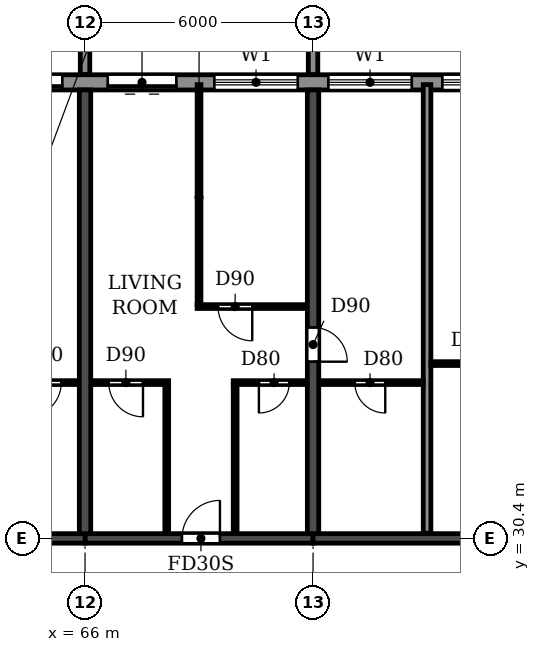
"""IFC4 building model, lengths in metres.
Left out: names, types, materials, properties, quantities, classifications, styles, units other than length and angle.
Written with IfcOpenShell. Run it as: python <this file> out.ifc"""

import sys

from ifc_helpers import new_model, si_unit, direction, frame, frame_2d, origin, place, context, subcontext, project, spatial, polyline, rectangle, outline, extrude, source, transform, mapped, element, fill, save


model = new_model("IFC4")
c1 = context("Model", 3, precision=1e-05, world=origin(), true_north=direction((0.0, 1.0)))
c2 = subcontext(c1, "Body", "Model", "MODEL_VIEW")
j1 = project(units=[si_unit("LENGTHUNIT", "METRE"), si_unit("PLANEANGLEUNIT", "RADIAN")], contexts=[c1])
p1 = place(None, origin())
s1 = spatial("IfcSite", under=j1, at=p1, CompositionType="ELEMENT")
p2 = place(p1, origin())
s2 = spatial("IfcBuilding", under=s1, at=p2, CompositionType="ELEMENT")
p3 = place(p2, frame((0.0, 0.0, 125.7)))
s3 = spatial("IfcBuildingStorey", under=s2, at=p3, CompositionType="ELEMENT", Elevation=125.7)
p4 = place(p3, frame((66.0, 30.525, 0.0), z_axis=(0.0, 0.0, 1.0), x_axis=(0.0, 1.0, 0.0)))
e1 = element("IfcWall", 1, at=p4, inside=s3, PredefinedType="SHEAR", context=c2, shape_type="SweptSolid", body=[
    extrude(rectangle(XDim=11.675, YDim=0.3, at=frame_2d((5.837, 0.0))), origin(), (0.0, 0.0, 1.0), 3.07),
])
p5 = place(p3, frame((72.0, 30.525, 0.0), z_axis=(0.0, 0.0, 1.0), x_axis=(0.0, 1.0, 0.0)))
e2 = element("IfcWall", 2, at=p5, inside=s3, PredefinedType="SHEAR", context=c2, shape_type="SweptSolid", body=[
    extrude(rectangle(XDim=11.675, YDim=0.3, at=frame_2d((5.837, 0.0))), origin(), (0.0, 0.0, 1.0), 3.07),
])
p6 = place(p5, frame((4.525, 0.0, 0.0)))
e3 = element("IfcOpeningElement", 3, at=p6, cuts=e2, PredefinedType="OPENING", context=c2, shape_type="SweptSolid", body=[
    extrude(rectangle(XDim=0.9, YDim=2.1, at=frame_2d((0.45, 1.05))), frame((0.0, 0.16, 0.0), z_axis=(0.0, -1.0, 0.0), x_axis=(1.0, 0.0, 0.0)), (0.0, 0.0, 1.0), 0.32),
])
p7 = place(p3, frame((60.0, 30.4, 0.0), z_axis=(0.0, 0.0, 1.0), x_axis=(1.0, 0.0, 0.0)))
e4 = element("IfcWall", 4, at=p7, inside=s3, PredefinedType="SHEAR", context=c2, shape_type="SweptSolid", body=[
    extrude(rectangle(XDim=6.0, YDim=0.25, at=frame_2d((3.0, 0.0))), origin(), (0.0, 0.0, 1.0), 2.47),
])
p8 = place(p7, frame((2.45, 0.0, 0.0)))
e5 = element("IfcOpeningElement", 5, at=p8, cuts=e4, PredefinedType="OPENING", context=c2, shape_type="SweptSolid", body=[
    extrude(rectangle(XDim=1.0, YDim=2.1, at=frame_2d((0.5, 1.05))), frame((0.0, 0.135, 0.0), z_axis=(0.0, -1.0, 0.0), x_axis=(1.0, 0.0, 0.0)), (0.0, 0.0, 1.0), 0.27),
])
p9 = place(p3, frame((66.0, 30.4, 0.0), z_axis=(0.0, 0.0, 1.0), x_axis=(1.0, 0.0, 0.0)))
e6 = element("IfcWall", 6, at=p9, inside=s3, PredefinedType="SHEAR", context=c2, shape_type="SweptSolid", body=[
    extrude(rectangle(XDim=6.0, YDim=0.25, at=frame_2d((3.0, 0.0))), origin(), (0.0, 0.0, 1.0), 2.47),
])
p10 = place(p9, frame((2.55, 0.0, 0.0)))
e7 = element("IfcOpeningElement", 7, at=p10, cuts=e6, PredefinedType="OPENING", context=c2, shape_type="SweptSolid", body=[
    extrude(rectangle(XDim=1.0, YDim=2.1, at=frame_2d((0.5, 1.05))), frame((0.0, 0.135, 0.0), z_axis=(0.0, -1.0, 0.0), x_axis=(1.0, 0.0, 0.0)), (0.0, 0.0, 1.0), 0.27),
])
p11 = place(p3, frame((72.0, 30.4, 0.0), z_axis=(0.0, 0.0, 1.0), x_axis=(1.0, 0.0, 0.0)))
e8 = element("IfcWall", 8, at=p11, inside=s3, PredefinedType="SHEAR", context=c2, shape_type="SweptSolid", body=[
    extrude(rectangle(XDim=6.0, YDim=0.25, at=frame_2d((3.0, 0.0))), origin(), (0.0, 0.0, 1.0), 2.47),
])
p12 = place(p3, frame((85.317, 42.4, 0.0), z_axis=(0.0, 0.0, 1.0), x_axis=(-1.0, 0.0, 0.0)))
e9 = element("IfcWall", 9, at=p12, inside=s3, PredefinedType="STANDARD", context=c2, shape_type="SweptSolid", body=[
    extrude(rectangle(XDim=68.634, YDim=0.4, at=frame_2d((34.317, 0.0))), origin(), (0.0, 0.0, 1.0), 3.07),
])
p13 = place(p12, frame((64.717, 0.0, 0.9)))
e10 = element("IfcOpeningElement", 10, at=p13, cuts=e9, PredefinedType="OPENING", context=c2, shape_type="SweptSolid", body=[
    extrude(rectangle(XDim=2.2, YDim=1.5, at=frame_2d((1.1, 0.75))), frame((0.0, 0.21, 0.0), z_axis=(0.0, -1.0, 0.0), x_axis=(1.0, 0.0, 0.0)), (0.0, 0.0, 1.0), 0.42),
])
p14 = place(p12, frame((61.917, 0.0, 0.0)))
e11 = element("IfcOpeningElement", 11, at=p14, cuts=e9, PredefinedType="OPENING", context=c2, shape_type="SweptSolid", body=[
    extrude(rectangle(XDim=1.8, YDim=2.4, at=frame_2d((0.9, 1.2))), frame((0.0, 0.21, 0.0), z_axis=(0.0, -1.0, 0.0), x_axis=(1.0, 0.0, 0.0)), (0.0, 0.0, 1.0), 0.42),
])
p15 = place(p12, frame((58.717, 0.0, 0.9)))
e12 = element("IfcOpeningElement", 12, at=p15, cuts=e9, PredefinedType="OPENING", context=c2, shape_type="SweptSolid", body=[
    extrude(rectangle(XDim=2.2, YDim=1.5, at=frame_2d((1.1, 0.75))), frame((0.0, 0.21, 0.0), z_axis=(0.0, -1.0, 0.0), x_axis=(1.0, 0.0, 0.0)), (0.0, 0.0, 1.0), 0.42),
])
p16 = place(p12, frame((55.917, 0.0, 0.0)))
e13 = element("IfcOpeningElement", 13, at=p16, cuts=e9, PredefinedType="OPENING", context=c2, shape_type="SweptSolid", body=[
    extrude(rectangle(XDim=1.8, YDim=2.4, at=frame_2d((0.9, 1.2))), frame((0.0, 0.21, 0.0), z_axis=(0.0, -1.0, 0.0), x_axis=(1.0, 0.0, 0.0)), (0.0, 0.0, 1.0), 0.42),
])
p17 = place(p12, frame((52.717, 0.0, 0.9)))
e14 = element("IfcOpeningElement", 14, at=p17, cuts=e9, PredefinedType="OPENING", context=c2, shape_type="SweptSolid", body=[
    extrude(rectangle(XDim=2.2, YDim=1.5, at=frame_2d((1.1, 0.75))), frame((0.0, 0.21, 0.0), z_axis=(0.0, -1.0, 0.0), x_axis=(1.0, 0.0, 0.0)), (0.0, 0.0, 1.0), 0.42),
])
p18 = place(p12, frame((49.917, 0.0, 0.0)))
e15 = element("IfcOpeningElement", 15, at=p18, cuts=e9, PredefinedType="OPENING", context=c2, shape_type="SweptSolid", body=[
    extrude(rectangle(XDim=1.8, YDim=2.4, at=frame_2d((0.9, 1.2))), frame((0.0, 0.21, 0.0), z_axis=(0.0, -1.0, 0.0), x_axis=(1.0, 0.0, 0.0)), (0.0, 0.0, 1.0), 0.42),
])
p19 = place(p12, frame((46.717, 0.0, 0.9)))
e16 = element("IfcOpeningElement", 16, at=p19, cuts=e9, PredefinedType="OPENING", context=c2, shape_type="SweptSolid", body=[
    extrude(rectangle(XDim=2.2, YDim=1.5, at=frame_2d((1.1, 0.75))), frame((0.0, 0.21, 0.0), z_axis=(0.0, -1.0, 0.0), x_axis=(1.0, 0.0, 0.0)), (0.0, 0.0, 1.0), 0.42),
])
p20 = place(p12, frame((43.917, 0.0, 0.0)))
e17 = element("IfcOpeningElement", 17, at=p20, cuts=e9, PredefinedType="OPENING", context=c2, shape_type="SweptSolid", body=[
    extrude(rectangle(XDim=1.8, YDim=2.4, at=frame_2d((0.9, 1.2))), frame((0.0, 0.21, 0.0), z_axis=(0.0, -1.0, 0.0), x_axis=(1.0, 0.0, 0.0)), (0.0, 0.0, 1.0), 0.42),
])
p21 = place(p12, frame((40.717, 0.0, 0.9)))
e18 = element("IfcOpeningElement", 18, at=p21, cuts=e9, PredefinedType="OPENING", context=c2, shape_type="SweptSolid", body=[
    extrude(rectangle(XDim=2.2, YDim=1.5, at=frame_2d((1.1, 0.75))), frame((0.0, 0.21, 0.0), z_axis=(0.0, -1.0, 0.0), x_axis=(1.0, 0.0, 0.0)), (0.0, 0.0, 1.0), 0.42),
])
p22 = place(p12, frame((37.717, 0.0, 0.9)))
e19 = element("IfcOpeningElement", 19, at=p22, cuts=e9, PredefinedType="OPENING", context=c2, shape_type="SweptSolid", body=[
    extrude(rectangle(XDim=2.2, YDim=1.5, at=frame_2d((1.1, 0.75))), frame((0.0, 0.21, 0.0), z_axis=(0.0, -1.0, 0.0), x_axis=(1.0, 0.0, 0.0)), (0.0, 0.0, 1.0), 0.42),
])
p23 = place(p12, frame((34.917, 0.0, 0.0)))
e20 = element("IfcOpeningElement", 20, at=p23, cuts=e9, PredefinedType="OPENING", context=c2, shape_type="SweptSolid", body=[
    extrude(rectangle(XDim=1.8, YDim=2.4, at=frame_2d((0.9, 1.2))), frame((0.0, 0.21, 0.0), z_axis=(0.0, -1.0, 0.0), x_axis=(1.0, 0.0, 0.0)), (0.0, 0.0, 1.0), 0.42),
])
p24 = place(p12, frame((31.717, 0.0, 0.9)))
e21 = element("IfcOpeningElement", 21, at=p24, cuts=e9, PredefinedType="OPENING", context=c2, shape_type="SweptSolid", body=[
    extrude(rectangle(XDim=2.2, YDim=1.5, at=frame_2d((1.1, 0.75))), frame((0.0, 0.21, 0.0), z_axis=(0.0, -1.0, 0.0), x_axis=(1.0, 0.0, 0.0)), (0.0, 0.0, 1.0), 0.42),
])
p25 = place(p12, frame((28.717, 0.0, 0.9)))
e22 = element("IfcOpeningElement", 22, at=p25, cuts=e9, PredefinedType="OPENING", context=c2, shape_type="SweptSolid", body=[
    extrude(rectangle(XDim=2.2, YDim=1.5, at=frame_2d((1.1, 0.75))), frame((0.0, 0.21, 0.0), z_axis=(0.0, -1.0, 0.0), x_axis=(1.0, 0.0, 0.0)), (0.0, 0.0, 1.0), 0.42),
])
p26 = place(p12, frame((25.717, 0.0, 0.9)))
e23 = element("IfcOpeningElement", 23, at=p26, cuts=e9, PredefinedType="OPENING", context=c2, shape_type="SweptSolid", body=[
    extrude(rectangle(XDim=2.2, YDim=1.5, at=frame_2d((1.1, 0.75))), frame((0.0, 0.21, 0.0), z_axis=(0.0, -1.0, 0.0), x_axis=(1.0, 0.0, 0.0)), (0.0, 0.0, 1.0), 0.42),
])
p27 = place(p12, frame((22.717, 0.0, 0.9)))
e24 = element("IfcOpeningElement", 24, at=p27, cuts=e9, PredefinedType="OPENING", context=c2, shape_type="SweptSolid", body=[
    extrude(rectangle(XDim=2.2, YDim=1.5, at=frame_2d((1.1, 0.75))), frame((0.0, 0.21, 0.0), z_axis=(0.0, -1.0, 0.0), x_axis=(1.0, 0.0, 0.0)), (0.0, 0.0, 1.0), 0.42),
])
p28 = place(p12, frame((19.917, 0.0, 0.0)))
e25 = element("IfcOpeningElement", 25, at=p28, cuts=e9, PredefinedType="OPENING", context=c2, shape_type="SweptSolid", body=[
    extrude(rectangle(XDim=1.8, YDim=2.4, at=frame_2d((0.9, 1.2))), frame((0.0, 0.21, 0.0), z_axis=(0.0, -1.0, 0.0), x_axis=(1.0, 0.0, 0.0)), (0.0, 0.0, 1.0), 0.42),
])
p29 = place(p12, frame((16.917, 0.0, 0.0)))
e26 = element("IfcOpeningElement", 26, at=p29, cuts=e9, PredefinedType="OPENING", context=c2, shape_type="SweptSolid", body=[
    extrude(rectangle(XDim=1.8, YDim=2.4, at=frame_2d((0.9, 1.2))), frame((0.0, 0.21, 0.0), z_axis=(0.0, -1.0, 0.0), x_axis=(1.0, 0.0, 0.0)), (0.0, 0.0, 1.0), 0.42),
])
p30 = place(p12, frame((13.717, 0.0, 0.9)))
e27 = element("IfcOpeningElement", 27, at=p30, cuts=e9, PredefinedType="OPENING", context=c2, shape_type="SweptSolid", body=[
    extrude(rectangle(XDim=2.2, YDim=1.5, at=frame_2d((1.1, 0.75))), frame((0.0, 0.21, 0.0), z_axis=(0.0, -1.0, 0.0), x_axis=(1.0, 0.0, 0.0)), (0.0, 0.0, 1.0), 0.42),
])
p31 = place(p12, frame((10.717, 0.0, 0.9)))
e28 = element("IfcOpeningElement", 28, at=p31, cuts=e9, PredefinedType="OPENING", context=c2, shape_type="SweptSolid", body=[
    extrude(rectangle(XDim=2.2, YDim=1.5, at=frame_2d((1.1, 0.75))), frame((0.0, 0.21, 0.0), z_axis=(0.0, -1.0, 0.0), x_axis=(1.0, 0.0, 0.0)), (0.0, 0.0, 1.0), 0.42),
])
p32 = place(p12, frame((7.717, 0.0, 0.9)))
e29 = element("IfcOpeningElement", 29, at=p32, cuts=e9, PredefinedType="OPENING", context=c2, shape_type="SweptSolid", body=[
    extrude(rectangle(XDim=2.2, YDim=1.5, at=frame_2d((1.1, 0.75))), frame((0.0, 0.21, 0.0), z_axis=(0.0, -1.0, 0.0), x_axis=(1.0, 0.0, 0.0)), (0.0, 0.0, 1.0), 0.42),
])
p33 = place(p12, frame((4.917, 0.0, 0.0)))
e30 = element("IfcOpeningElement", 30, at=p33, cuts=e9, PredefinedType="OPENING", context=c2, shape_type="SweptSolid", body=[
    extrude(rectangle(XDim=1.8, YDim=2.4, at=frame_2d((0.9, 1.2))), frame((0.0, 0.21, 0.0), z_axis=(0.0, -1.0, 0.0), x_axis=(1.0, 0.0, 0.0)), (0.0, 0.0, 1.0), 0.42),
])
p34 = place(p12, frame((1.717, 0.0, 0.9)))
e31 = element("IfcOpeningElement", 31, at=p34, cuts=e9, PredefinedType="OPENING", context=c2, shape_type="SweptSolid", body=[
    extrude(rectangle(XDim=2.2, YDim=1.5, at=frame_2d((1.1, 0.75))), frame((0.0, 0.21, 0.0), z_axis=(0.0, -1.0, 0.0), x_axis=(1.0, 0.0, 0.0)), (0.0, 0.0, 1.0), 0.42),
])
m1 = source(origin(), c2, "Body", "SweptSolid", [
    extrude(outline(polyline([(0.0, 0.0), (0.25, 0.0), (0.25, 3.1), (0.0, 3.1), (0.0, 0.0)])), origin(), (0.0, 0.0, 1.0), 3.1),
])
for number, where in (
    (32, (65.875, 42.6, 0.0)),
    (33, (71.875, 42.6, 0.0)),
):
    element("IfcWall", number, at=place(p3, frame(where)), inside=s3, PredefinedType="STANDARD", context=c2, shape_type="MappedRepresentation", body=[
        mapped(m1, transform((0.0, 0.0, 0.0))),
    ])
p35 = place(p3, frame((75.0, 30.535, 0.0), z_axis=(0.0, 0.0, 1.0), x_axis=(0.0, 1.0, 0.0)))
e34 = element("IfcWall", 34, at=p35, inside=s3, PredefinedType="PARTITIONING", context=c2, shape_type="SweptSolid", body=[
    extrude(rectangle(XDim=11.805, YDim=0.2, at=frame_2d((5.903, 0.0))), origin(), (0.0, 0.0, 1.0), 3.07),
])
p36 = place(p3, frame((63.8, 34.5, 0.0), z_axis=(0.0, 0.0, 1.0), x_axis=(1.0, 0.0, 0.0)))
e35 = element("IfcWall", 35, at=p36, inside=s3, PredefinedType="PARTITIONING", context=c2, shape_type="SweptSolid", body=[
    extrude(rectangle(XDim=2.04, YDim=0.1, at=frame_2d((1.02, 0.0))), origin(), (0.0, 0.0, 1.0), 3.07),
])
p37 = place(p36, frame((0.675, 0.0, 0.0)))
e36 = element("IfcOpeningElement", 36, at=p37, cuts=e35, PredefinedType="OPENING", context=c2, shape_type="SweptSolid", body=[
    extrude(rectangle(XDim=0.9, YDim=2.1, at=frame_2d((0.45, 1.05))), frame((0.0, 0.06, 0.0), z_axis=(0.0, -1.0, 0.0), x_axis=(1.0, 0.0, 0.0)), (0.0, 0.0, 1.0), 0.12),
])
p38 = place(p3, frame((66.16, 34.5, 0.0), z_axis=(0.0, 0.0, 1.0), x_axis=(1.0, 0.0, 0.0)))
e37 = element("IfcWall", 37, at=p38, inside=s3, PredefinedType="PARTITIONING", context=c2, shape_type="SweptSolid", body=[
    extrude(rectangle(XDim=2.04, YDim=0.1, at=frame_2d((1.02, 0.0))), origin(), (0.0, 0.0, 1.0), 3.07),
])
p39 = place(p38, frame((0.465, 0.0, 0.0)))
e38 = element("IfcOpeningElement", 38, at=p39, cuts=e37, PredefinedType="OPENING", context=c2, shape_type="SweptSolid", body=[
    extrude(rectangle(XDim=0.9, YDim=2.1, at=frame_2d((0.45, 1.05))), frame((0.0, 0.06, 0.0), z_axis=(0.0, -1.0, 0.0), x_axis=(1.0, 0.0, 0.0)), (0.0, 0.0, 1.0), 0.12),
])
p40 = place(p3, frame((69.9, 34.5, 0.0), z_axis=(0.0, 0.0, 1.0), x_axis=(1.0, 0.0, 0.0)))
e39 = element("IfcWall", 39, at=p40, inside=s3, PredefinedType="PARTITIONING", context=c2, shape_type="SweptSolid", body=[
    extrude(rectangle(XDim=1.94, YDim=0.1, at=frame_2d((0.97, 0.0))), origin(), (0.0, 0.0, 1.0), 3.07),
])
p41 = place(p40, frame((0.675, 0.0, 0.0)))
e40 = element("IfcOpeningElement", 40, at=p41, cuts=e39, PredefinedType="OPENING", context=c2, shape_type="SweptSolid", body=[
    extrude(rectangle(XDim=0.8, YDim=2.1, at=frame_2d((0.4, 1.05))), frame((0.0, 0.06, 0.0), z_axis=(0.0, -1.0, 0.0), x_axis=(1.0, 0.0, 0.0)), (0.0, 0.0, 1.0), 0.12),
])
p42 = place(p3, frame((72.16, 34.5, 0.0), z_axis=(0.0, 0.0, 1.0), x_axis=(1.0, 0.0, 0.0)))
e41 = element("IfcWall", 41, at=p42, inside=s3, PredefinedType="PARTITIONING", context=c2, shape_type="SweptSolid", body=[
    extrude(rectangle(XDim=2.74, YDim=0.1, at=frame_2d((1.37, 0.0))), origin(), (0.0, 0.0, 1.0), 3.07),
])
p43 = place(p42, frame((0.94, 0.0, 0.0)))
e42 = element("IfcOpeningElement", 42, at=p43, cuts=e41, PredefinedType="OPENING", context=c2, shape_type="SweptSolid", body=[
    extrude(rectangle(XDim=0.8, YDim=2.1, at=frame_2d((0.4, 1.05))), frame((0.0, 0.06, 0.0), z_axis=(0.0, -1.0, 0.0), x_axis=(1.0, 0.0, 0.0)), (0.0, 0.0, 1.0), 0.12),
])
p44 = place(p3, frame((75.1, 35.0, 0.0), z_axis=(0.0, 0.0, 1.0), x_axis=(1.0, 0.0, 0.0)))
e43 = element("IfcWall", 43, at=p44, inside=s3, PredefinedType="PARTITIONING", context=c2, shape_type="SweptSolid", body=[
    extrude(rectangle(XDim=2.74, YDim=0.1, at=frame_2d((1.37, 0.0))), origin(), (0.0, 0.0, 1.0), 3.07),
])
p45 = place(p44, frame((1.0, 0.0, 0.0)))
e44 = element("IfcOpeningElement", 44, at=p45, cuts=e43, PredefinedType="OPENING", context=c2, shape_type="SweptSolid", body=[
    extrude(rectangle(XDim=0.8, YDim=2.1, at=frame_2d((0.4, 1.05))), frame((0.0, 0.06, 0.0), z_axis=(0.0, -1.0, 0.0), x_axis=(1.0, 0.0, 0.0)), (0.0, 0.0, 1.0), 0.12),
])
p46 = place(p3, frame((68.95, 36.5, 0.0), z_axis=(0.0, 0.0, 1.0), x_axis=(1.0, 0.0, 0.0)))
e45 = element("IfcWall", 45, at=p46, inside=s3, PredefinedType="PARTITIONING", context=c2, shape_type="SweptSolid", body=[
    extrude(rectangle(XDim=2.89, YDim=0.1, at=frame_2d((1.445, 0.0))), origin(), (0.0, 0.0, 1.0), 3.07),
])
p47 = place(p46, frame((0.55, 0.0, 0.0)))
e46 = element("IfcOpeningElement", 46, at=p47, cuts=e45, PredefinedType="OPENING", context=c2, shape_type="SweptSolid", body=[
    extrude(rectangle(XDim=0.9, YDim=2.1, at=frame_2d((0.45, 1.05))), frame((0.0, 0.06, 0.0), z_axis=(0.0, -1.0, 0.0), x_axis=(1.0, 0.0, 0.0)), (0.0, 0.0, 1.0), 0.12),
])
p48 = place(p3, frame((68.15, 30.535, 0.0), z_axis=(0.0, 0.0, 1.0), x_axis=(0.0, 1.0, 0.0)))
e47 = element("IfcWall", 47, at=p48, inside=s3, PredefinedType="PARTITIONING", context=c2, shape_type="SweptSolid", body=[
    extrude(rectangle(XDim=3.915, YDim=0.1, at=frame_2d((1.958, 0.0))), origin(), (0.0, 0.0, 1.0), 3.07),
])
p49 = place(p3, frame((69.0, 36.55, 0.0), z_axis=(0.0, 0.0, 1.0), x_axis=(0.0, 1.0, 0.0)))
e48 = element("IfcWall", 48, at=p49, inside=s3, PredefinedType="PARTITIONING", context=c2, shape_type="SweptSolid", body=[
    extrude(rectangle(XDim=5.79, YDim=0.1, at=frame_2d((2.895, 0.0))), origin(), (0.0, 0.0, 1.0), 3.07),
])
p50 = place(p3, frame((69.95, 30.535, 0.0), z_axis=(0.0, 0.0, 1.0), x_axis=(0.0, 1.0, 0.0)))
e49 = element("IfcWall", 49, at=p50, inside=s3, PredefinedType="PARTITIONING", context=c2, shape_type="SweptSolid", body=[
    extrude(rectangle(XDim=3.915, YDim=0.1, at=frame_2d((1.958, 0.0))), origin(), (0.0, 0.0, 1.0), 3.07),
])
p51 = place(p28, origin())
e50 = element("IfcDoor", 50, at=p51, inside=s3, OperationType="DOUBLE_DOOR_SLIDING", PredefinedType="DOOR", context=c2, shape_type="SweptSolid", body=[
    extrude(rectangle(XDim=1.8, YDim=2.4, at=frame_2d((0.9, 1.2))), frame((0.0, 0.025, 0.0), z_axis=(0.0, -1.0, 0.0), x_axis=(1.0, 0.0, 0.0)), (0.0, 0.0, 1.0), 0.05),
])
fill(e25, e50)
p52 = place(p29, origin())
e51 = element("IfcDoor", 51, at=p52, inside=s3, OperationType="DOUBLE_DOOR_SLIDING", PredefinedType="DOOR", context=c2, shape_type="SweptSolid", body=[
    extrude(rectangle(XDim=1.8, YDim=2.4, at=frame_2d((0.9, 1.2))), frame((0.0, 0.025, 0.0), z_axis=(0.0, -1.0, 0.0), x_axis=(1.0, 0.0, 0.0)), (0.0, 0.0, 1.0), 0.05),
])
fill(e26, e51)
p53 = place(p30, origin())
e52 = element("IfcWindow", 52, at=p53, inside=s3, PartitioningType="DOUBLE_PANEL_HORIZONTAL", PredefinedType="WINDOW", context=c2, shape_type="SweptSolid", body=[
    extrude(rectangle(XDim=2.2, YDim=1.5, at=frame_2d((1.1, 0.75))), frame((0.0, 0.03, 0.0), z_axis=(0.0, -1.0, 0.0), x_axis=(1.0, 0.0, 0.0)), (0.0, 0.0, 1.0), 0.06),
])
fill(e27, e52)
p54 = place(p31, origin())
e53 = element("IfcWindow", 53, at=p54, inside=s3, PartitioningType="DOUBLE_PANEL_HORIZONTAL", PredefinedType="WINDOW", context=c2, shape_type="SweptSolid", body=[
    extrude(rectangle(XDim=2.2, YDim=1.5, at=frame_2d((1.1, 0.75))), frame((0.0, 0.03, 0.0), z_axis=(0.0, -1.0, 0.0), x_axis=(1.0, 0.0, 0.0)), (0.0, 0.0, 1.0), 0.06),
])
fill(e28, e53)
p55 = place(p32, origin())
e54 = element("IfcWindow", 54, at=p55, inside=s3, PartitioningType="DOUBLE_PANEL_HORIZONTAL", PredefinedType="WINDOW", context=c2, shape_type="SweptSolid", body=[
    extrude(rectangle(XDim=2.2, YDim=1.5, at=frame_2d((1.1, 0.75))), frame((0.0, 0.03, 0.0), z_axis=(0.0, -1.0, 0.0), x_axis=(1.0, 0.0, 0.0)), (0.0, 0.0, 1.0), 0.06),
])
fill(e29, e54)
p56 = place(p37, frame((0.9, 0.0, 0.0), z_axis=(0.0, 0.0, 1.0), x_axis=(-1.0, 0.0, 0.0)))
e55 = element("IfcDoor", 55, at=p56, inside=s3, OperationType="SINGLE_SWING_RIGHT", PredefinedType="DOOR", context=c2, shape_type="SweptSolid", body=[
    extrude(rectangle(XDim=0.9, YDim=2.1, at=frame_2d((0.45, 1.05))), frame((0.0, 0.025, 0.0), z_axis=(0.0, -1.0, 0.0), x_axis=(1.0, 0.0, 0.0)), (0.0, 0.0, 1.0), 0.05),
])
fill(e36, e55)
p57 = place(p43, frame((0.8, 0.0, 0.0), z_axis=(0.0, 0.0, 1.0), x_axis=(-1.0, 0.0, 0.0)))
e56 = element("IfcDoor", 56, at=p57, inside=s3, OperationType="SINGLE_SWING_LEFT", PredefinedType="DOOR", context=c2, shape_type="SweptSolid", body=[
    extrude(rectangle(XDim=0.8, YDim=2.1, at=frame_2d((0.4, 1.05))), frame((0.0, 0.025, 0.0), z_axis=(0.0, -1.0, 0.0), x_axis=(1.0, 0.0, 0.0)), (0.0, 0.0, 1.0), 0.05),
])
fill(e42, e56)
p58 = place(p39, frame((0.9, 0.0, 0.0), z_axis=(0.0, 0.0, 1.0), x_axis=(-1.0, 0.0, 0.0)))
e57 = element("IfcDoor", 57, at=p58, inside=s3, OperationType="SINGLE_SWING_LEFT", PredefinedType="DOOR", context=c2, shape_type="SweptSolid", body=[
    extrude(rectangle(XDim=0.9, YDim=2.1, at=frame_2d((0.45, 1.05))), frame((0.0, 0.025, 0.0), z_axis=(0.0, -1.0, 0.0), x_axis=(1.0, 0.0, 0.0)), (0.0, 0.0, 1.0), 0.05),
])
fill(e38, e57)
p59 = place(p10, origin())
e58 = element("IfcDoor", 58, at=p59, inside=s3, OperationType="SINGLE_SWING_RIGHT", PredefinedType="DOOR", context=c2, shape_type="SweptSolid", body=[
    extrude(rectangle(XDim=1.0, YDim=2.1, at=frame_2d((0.5, 1.05))), frame((0.0, 0.025, 0.0), z_axis=(0.0, -1.0, 0.0), x_axis=(1.0, 0.0, 0.0)), (0.0, 0.0, 1.0), 0.05),
])
fill(e7, e58)
p60 = place(p47, frame((0.9, 0.0, 0.0), z_axis=(0.0, 0.0, 1.0), x_axis=(-1.0, 0.0, 0.0)))
e59 = element("IfcDoor", 59, at=p60, inside=s3, OperationType="SINGLE_SWING_LEFT", PredefinedType="DOOR", context=c2, shape_type="SweptSolid", body=[
    extrude(rectangle(XDim=0.9, YDim=2.1, at=frame_2d((0.45, 1.05))), frame((0.0, 0.025, 0.0), z_axis=(0.0, -1.0, 0.0), x_axis=(1.0, 0.0, 0.0)), (0.0, 0.0, 1.0), 0.05),
])
fill(e46, e59)
p61 = place(p41, frame((0.8, 0.0, 0.0), z_axis=(0.0, 0.0, 1.0), x_axis=(-1.0, 0.0, 0.0)))
e60 = element("IfcDoor", 60, at=p61, inside=s3, OperationType="SINGLE_SWING_RIGHT", PredefinedType="DOOR", context=c2, shape_type="SweptSolid", body=[
    extrude(rectangle(XDim=0.8, YDim=2.1, at=frame_2d((0.4, 1.05))), frame((0.0, 0.025, 0.0), z_axis=(0.0, -1.0, 0.0), x_axis=(1.0, 0.0, 0.0)), (0.0, 0.0, 1.0), 0.05),
])
fill(e40, e60)
p62 = place(p6, frame((0.9, 0.0, 0.0), z_axis=(0.0, 0.0, 1.0), x_axis=(-1.0, 0.0, 0.0)))
e61 = element("IfcDoor", 61, at=p62, inside=s3, OperationType="SINGLE_SWING_RIGHT", PredefinedType="DOOR", context=c2, shape_type="SweptSolid", body=[
    extrude(rectangle(XDim=0.9, YDim=2.1, at=frame_2d((0.45, 1.05))), frame((0.0, 0.025, 0.0), z_axis=(0.0, -1.0, 0.0), x_axis=(1.0, 0.0, 0.0)), (0.0, 0.0, 1.0), 0.05),
])
fill(e3, e61)
save(model, sys.argv[1])
